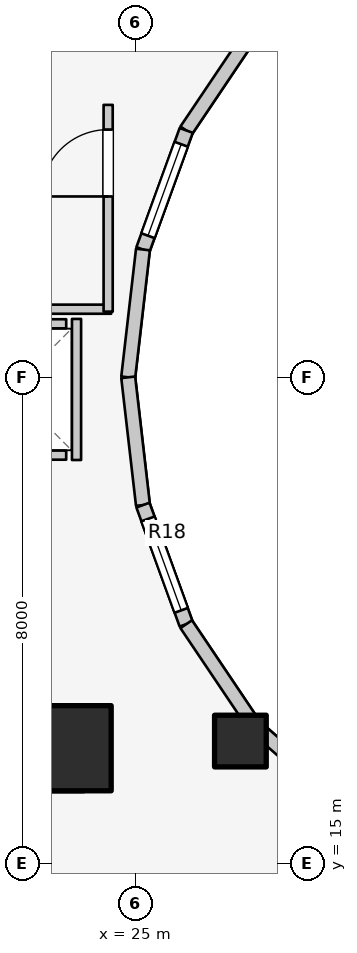
"""IFC4 building model, lengths in metres.
Left out: names, types, materials, properties, quantities, classifications, styles, units other than length and angle.
Written with IfcOpenShell. Run it as: python <this file> out.ifc"""

import sys

from ifc_helpers import new_model, si_unit, direction, frame, frame_2d, origin, origin_2d, place, context, subcontext, project, spatial, rectangle, extrude, element, fill, save


model = new_model("IFC4")
c1 = context("Model", 3, precision=1e-05, world=origin(), true_north=direction((0.0, 1.0)))
c2 = subcontext(c1, "Body", "Model", "MODEL_VIEW")
j1 = project(units=[si_unit("LENGTHUNIT", "METRE"), si_unit("PLANEANGLEUNIT", "RADIAN")], contexts=[c1])
p1 = place(None, origin())
s1 = spatial("IfcSite", under=j1, at=p1, CompositionType="ELEMENT")
p2 = place(p1, origin())
s2 = spatial("IfcBuilding", under=s1, at=p2, CompositionType="ELEMENT")
p3 = place(p2, frame((0.0, 0.0, 122.8)))
s3 = spatial("IfcBuildingStorey", under=s2, at=p3, CompositionType="ELEMENT", Elevation=122.8)
p4 = place(p3, frame((19.65, 16.55, 0.0), z_axis=(0.0, 0.0, 1.0), x_axis=(1.0, 0.0, 0.0)))
e1 = element("IfcWall", 1, at=p4, inside=s3, PredefinedType="SHEAR", context=c2, shape_type="SweptSolid", body=[
    extrude(rectangle(XDim=4.5, YDim=0.7, at=frame_2d((2.25, 0.0))), origin(), (0.0, 0.0, 1.0), 3.1),
])
p5 = place(p3, frame((23.9, 16.9, 0.0), z_axis=(0.0, 0.0, 1.0), x_axis=(1.0, 0.0, 0.0)))
e2 = element("IfcColumn", 2, at=p5, inside=s3, PredefinedType="COLUMN", context=c2, shape_type="SweptSolid", body=[
    extrude(rectangle(XDim=1.4, YDim=1.4, at=origin_2d()), origin(), (0.0, 0.0, 1.0), 3.1),
])
p6 = place(p3, frame((26.725, 17.018, 0.0), z_axis=(0.0, 0.0, 1.0), x_axis=(1.0, 0.0, 0.0)))
e3 = element("IfcColumn", 3, at=p6, inside=s3, PredefinedType="COLUMN", context=c2, shape_type="SweptSolid", body=[
    extrude(rectangle(XDim=0.85, YDim=0.85, at=origin_2d()), origin(), (0.0, 0.0, 1.0), 3.1),
])
p7 = place(p3, frame((26.965, 28.742, 0.0), z_axis=(0.0, 0.0, 1.0), x_axis=(-0.558197800898, -0.829707909492, 0.0)))
e4 = element("IfcWall", 4, at=p7, inside=s3, PredefinedType="STANDARD", context=c2, shape_type="SweptSolid", body=[
    extrude(rectangle(XDim=2.027, YDim=0.23, at=frame_2d((1.013, 0.0))), origin(), (0.0, 0.0, 1.0), 2.16),
])
p8 = place(p3, frame((25.834, 27.06, 0.0), z_axis=(0.0, 0.0, 1.0), x_axis=(-0.341423187295, -0.93990968033, 0.0)))
e5 = element("IfcWall", 5, at=p8, inside=s3, PredefinedType="STANDARD", context=c2, shape_type="SweptSolid", body=[
    extrude(rectangle(XDim=2.084, YDim=0.23, at=frame_2d((1.042, 0.0))), origin(), (0.0, 0.0, 1.0), 2.84),
])
p9 = place(p8, frame((0.242, 0.0, 0.85)))
e6 = element("IfcOpeningElement", 6, at=p9, cuts=e5, PredefinedType="OPENING", context=c2, shape_type="SweptSolid", body=[
    extrude(rectangle(XDim=1.6, YDim=1.65, at=frame_2d((0.8, 0.825))), frame((0.0, 0.125, 0.0), z_axis=(0.0, -1.0, 0.0), x_axis=(1.0, 0.0, 0.0)), (0.0, 0.0, 1.0), 0.25),
])
for number, where, z_axis, x_axis in (
    (7, (25.123, 25.102, 0.0), (0.0, 0.0, 1.0), (-0.115, -0.993, 0.0)),
    (8, (24.88, 23.0, 0.0), (0.0, 0.0, 1.0), (0.115, -0.993, 0.0)),
):
    element("IfcWall", number, at=place(p3, frame(where, z_axis=z_axis, x_axis=x_axis)), inside=s3, PredefinedType="STANDARD", context=c2, shape_type="SweptSolid", body=[
        extrude(rectangle(XDim=2.115, YDim=0.23, at=frame_2d((1.058, 0.0))), origin(), (0.0, 0.0, 1.0), 2.84),
    ])
p10 = place(p3, frame((25.123, 20.898, 0.0), z_axis=(0.0, 0.0, 1.0), x_axis=(0.341423187295, -0.93990968033, 0.0)))
e9 = element("IfcWall", 9, at=p10, inside=s3, PredefinedType="STANDARD", context=c2, shape_type="SweptSolid", body=[
    extrude(rectangle(XDim=2.084, YDim=0.23, at=frame_2d((1.042, 0.0))), origin(), (0.0, 0.0, 1.0), 2.84),
])
p11 = place(p10, frame((0.242, 0.0, 0.85)))
e10 = element("IfcOpeningElement", 10, at=p11, cuts=e9, PredefinedType="OPENING", context=c2, shape_type="SweptSolid", body=[
    extrude(rectangle(XDim=1.6, YDim=1.65, at=frame_2d((0.8, 0.825))), frame((0.0, 0.125, 0.0), z_axis=(0.0, -1.0, 0.0), x_axis=(1.0, 0.0, 0.0)), (0.0, 0.0, 1.0), 0.25),
])
p12 = place(p3, frame((25.834, 18.94, 0.0), z_axis=(0.0, 0.0, 1.0), x_axis=(0.558197800898, -0.829707909492, 0.0)))
e11 = element("IfcWall", 11, at=p12, inside=s3, PredefinedType="STANDARD", context=c2, shape_type="SweptSolid", body=[
    extrude(rectangle(XDim=2.027, YDim=0.23, at=frame_2d((1.013, 0.0))), origin(), (0.0, 0.0, 1.0), 2.16),
])
p13 = place(p3, frame((26.965, 17.258, 0.0), z_axis=(0.0, 0.0, 1.0), x_axis=(0.752576694707, -0.658504607869, 0.0)))
e12 = element("IfcWall", 12, at=p13, inside=s3, PredefinedType="STANDARD", context=c2, shape_type="SweptSolid", body=[
    extrude(rectangle(XDim=1.959, YDim=0.23, at=frame_2d((0.98, 0.0))), origin(), (0.0, 0.0, 1.0), 2.16),
])
for number, where, z_axis, x_axis in (
    (13, (22.04, 21.72, 0.0), (0.0, 0.0, 1.0), (1.0, 0.0, 0.0)),
    (14, (22.04, 23.88, 0.0), (0.0, 0.0, 1.0), (1.0, 0.0, 0.0)),
):
    element("IfcWall", number, at=place(p3, frame(where, z_axis=z_axis, x_axis=x_axis)), inside=s3, PredefinedType="SOLIDWALL", context=c2, shape_type="SweptSolid", body=[
        extrude(rectangle(XDim=1.82, YDim=0.15, at=frame_2d((0.91, 0.0))), origin(), (0.0, 0.0, 1.0), 2.12),
    ])
p14 = place(p3, frame((24.03, 21.64, 0.0), z_axis=(0.0, 0.0, 1.0), x_axis=(0.0, 1.0, 0.0)))
e15 = element("IfcWall", 15, at=p14, inside=s3, PredefinedType="SOLIDWALL", context=c2, shape_type="SweptSolid", body=[
    extrude(rectangle(XDim=2.32, YDim=0.15, at=frame_2d((1.16, 0.0))), origin(), (0.0, 0.0, 1.0), 2.12),
])
p15 = place(p3, frame((19.52, 24.12, 0.0), z_axis=(0.0, 0.0, 1.0), x_axis=(1.0, 0.0, 0.0)))
e16 = element("IfcWall", 16, at=p15, inside=s3, PredefinedType="PARTITIONING", context=c2, shape_type="SweptSolid", body=[
    extrude(rectangle(XDim=5.08, YDim=0.15, at=frame_2d((2.54, 0.0))), origin(), (0.0, 0.0, 1.0), 2.12),
])
p16 = place(p3, frame((24.55, 24.08, 0.0), z_axis=(0.0, 0.0, 1.0), x_axis=(0.0, 1.0, 0.0)))
e17 = element("IfcWall", 17, at=p16, inside=s3, PredefinedType="PARTITIONING", context=c2, shape_type="SweptSolid", body=[
    extrude(rectangle(XDim=3.4, YDim=0.15, at=frame_2d((1.7, 0.0))), origin(), (0.0, 0.0, 1.0), 2.855),
])
p17 = place(p16, frame((1.894, 0.0, 0.0)))
e18 = element("IfcOpeningElement", 18, at=p17, cuts=e17, PredefinedType="OPENING", context=c2, shape_type="SweptSolid", body=[
    extrude(rectangle(XDim=1.1, YDim=2.1, at=frame_2d((0.55, 1.05))), frame((0.0, 0.085, 0.0), z_axis=(0.0, -1.0, 0.0), x_axis=(1.0, 0.0, 0.0)), (0.0, 0.0, 1.0), 0.17),
])
p18 = place(p3, frame((28.45, 15.985, 0.0), z_axis=(0.0, 0.0, 1.0), x_axis=(-0.523587550846, -0.851971875474, 0.0)))
e19 = element("IfcWall", 19, at=p18, inside=s3, PredefinedType="PARTITIONING", context=c2, shape_type="SweptSolid", body=[
    extrude(rectangle(XDim=3.153, YDim=0.125, at=frame_2d((1.577, 0.0))), origin(), (0.0, 0.0, 1.0), 2.272),
])
p19 = place(p9, origin())
e20 = element("IfcWindow", 20, at=p19, inside=s3, PartitioningType="SINGLE_PANEL", PredefinedType="WINDOW", context=c2, shape_type="SweptSolid", body=[
    extrude(rectangle(XDim=1.6, YDim=1.65, at=frame_2d((0.8, 0.825))), frame((0.0, 0.03, 0.0), z_axis=(0.0, -1.0, 0.0), x_axis=(1.0, 0.0, 0.0)), (0.0, 0.0, 1.0), 0.06),
])
fill(e6, e20)
p20 = place(p11, origin())
e21 = element("IfcWindow", 21, at=p20, inside=s3, PartitioningType="SINGLE_PANEL", PredefinedType="WINDOW", context=c2, shape_type="SweptSolid", body=[
    extrude(rectangle(XDim=1.6, YDim=1.65, at=frame_2d((0.8, 0.825))), frame((0.0, 0.03, 0.0), z_axis=(0.0, -1.0, 0.0), x_axis=(1.0, 0.0, 0.0)), (0.0, 0.0, 1.0), 0.06),
])
fill(e10, e21)
p21 = place(p17, origin())
e22 = element("IfcDoor", 22, at=p21, inside=s3, OperationType="SINGLE_SWING_LEFT", PredefinedType="DOOR", context=c2, shape_type="SweptSolid", body=[
    extrude(rectangle(XDim=1.1, YDim=2.1, at=frame_2d((0.55, 1.05))), frame((0.0, 0.025, 0.0), z_axis=(0.0, -1.0, 0.0), x_axis=(1.0, 0.0, 0.0)), (0.0, 0.0, 1.0), 0.05),
])
fill(e18, e22)
save(model, sys.argv[1])
